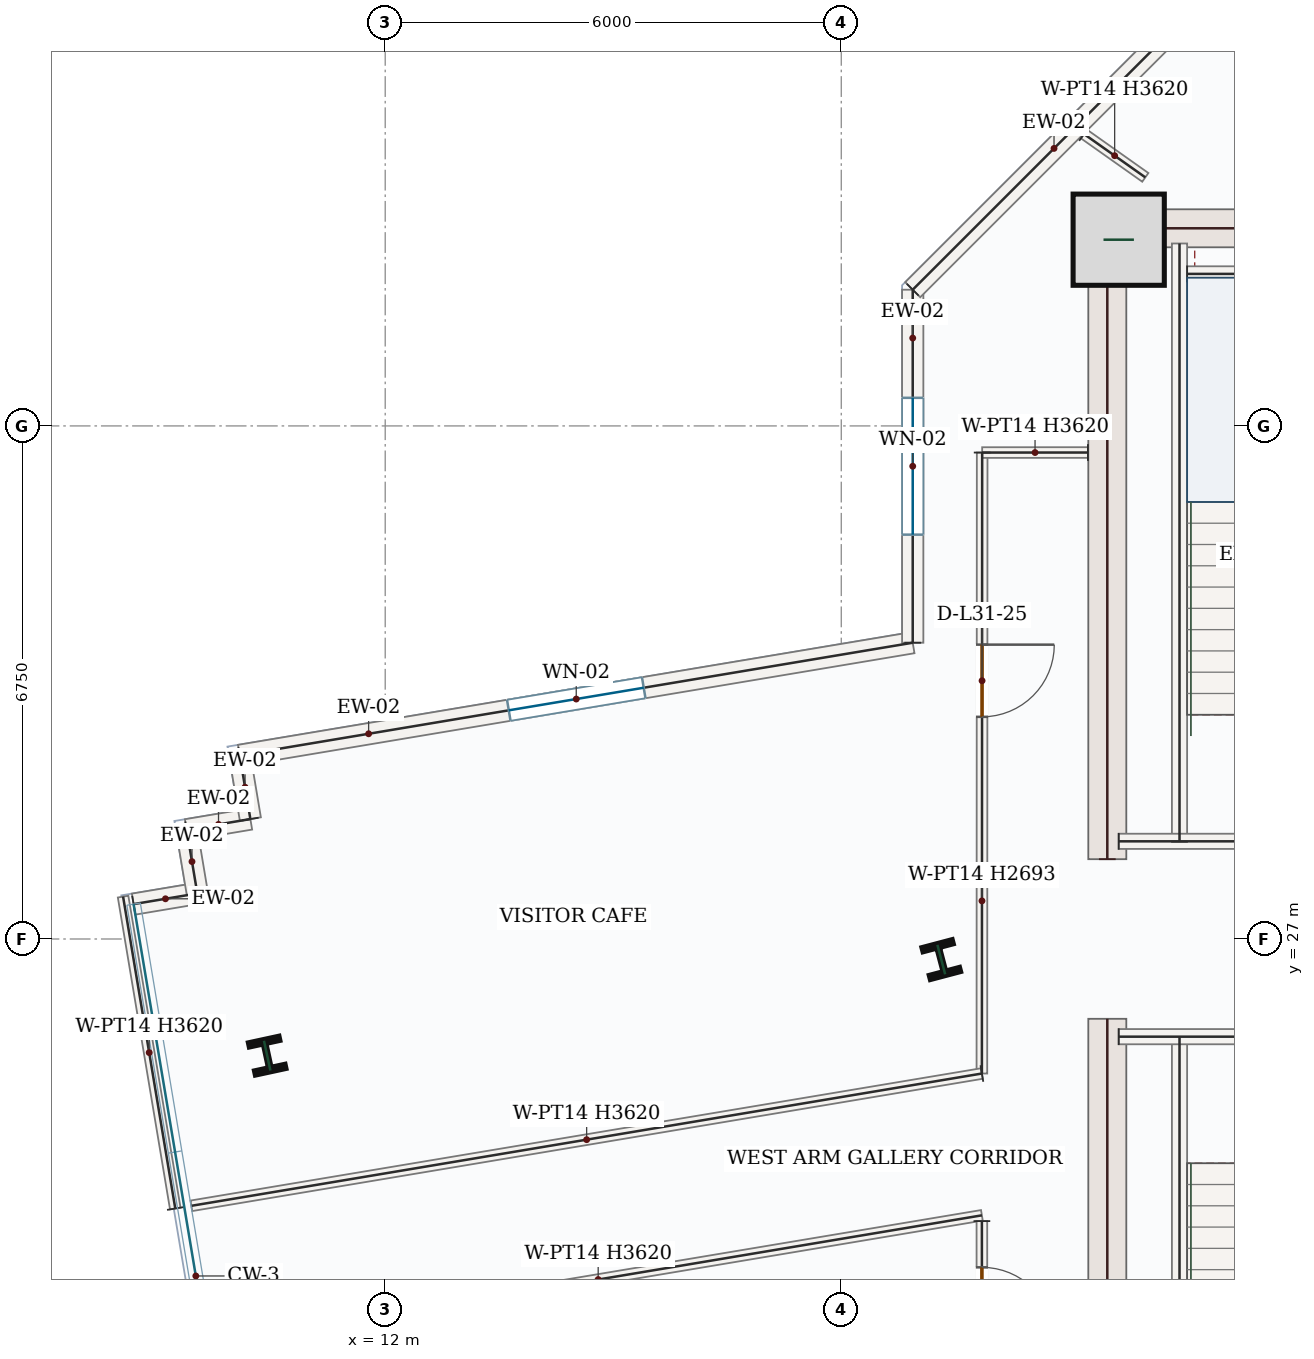
"""IFC4 building model, lengths in metres.
Left out: names, types, materials, properties, quantities, classifications, styles, units other than length and angle.
Written with IfcOpenShell. Run it as: python <this file> out.ifc"""

import sys

from ifc_helpers import new_model, si_unit, direction, frame, frame_2d, origin, origin_2d, place, context, subcontext, project, spatial, rectangle, i_section, extrude, source, transform, mapped, element, fill, save


model = new_model("IFC4")
c1 = context("Model", 3, precision=1e-05, world=origin(), true_north=direction((0.0, 1.0)))
c2 = subcontext(c1, "Body", "Model", "MODEL_VIEW")
j1 = project(units=[si_unit("LENGTHUNIT", "METRE"), si_unit("PLANEANGLEUNIT", "RADIAN")], contexts=[c1])
p1 = place(None, origin())
s1 = spatial("IfcSite", under=j1, at=p1, CompositionType="ELEMENT")
p2 = place(p1, origin())
s2 = spatial("IfcBuilding", under=s1, at=p2, CompositionType="ELEMENT")
p3 = place(p2, frame((0.0, 0.0, 139.5)))
s3 = spatial("IfcBuildingStorey", under=s2, at=p3, CompositionType="ELEMENT", Elevation=139.5)
m1 = source(origin(), c2, "Body", "SweptSolid", [
    extrude(rectangle(XDim=8.55, YDim=0.5, at=frame_2d((4.275, 0.0))), origin(), (0.0, 0.0, 1.0), 3.62),
])
for number, where, z_axis, x_axis in (
    (1, (21.5, 17.4, 0.0), (0.0, 0.0, 1.0), (0.0, 1.0, 0.0)),
    (2, (21.5, 28.05, 0.0), (0.0, 0.0, 1.0), (0.0, 1.0, 0.0)),
):
    element("IfcWall", number, at=place(p3, frame(where, z_axis=z_axis, x_axis=x_axis)), inside=s3, PredefinedType="SHEAR", context=c2, shape_type="MappedRepresentation", body=[
        mapped(m1, transform((0.0, 0.0, 0.0), x_axis=(1.0, 0.0, 0.0), y_axis=(0.0, 1.0, 0.0), z_axis=(0.0, 0.0, 1.0), scale=1.0)),
    ])
m2 = source(origin(), c2, "Body", "SweptSolid", [
    extrude(rectangle(XDim=7.0, YDim=0.5, at=frame_2d((3.5, 0.0))), origin(), (0.0, 0.0, 1.0), 3.62),
])
p4 = place(p3, frame((21.75, 36.35, 0.0), z_axis=(0.0, 0.0, 1.0), x_axis=(1.0, 0.0, 0.0)))
e3 = element("IfcWall", 3, at=p4, inside=s3, PredefinedType="SHEAR", context=c2, shape_type="MappedRepresentation", body=[
    mapped(m2, transform((0.0, 0.0, 0.0), x_axis=(1.0, 0.0, 0.0), y_axis=(0.0, 1.0, 0.0), z_axis=(0.0, 0.0, 1.0), scale=1.0)),
])
m3 = source(origin(), c2, "Body", "SweptSolid", [
    extrude(rectangle(XDim=1.2, YDim=1.2, at=origin_2d()), origin(), (0.0, 0.0, 1.0), 3.9),
])
p5 = place(p3, frame((21.65, 36.2, 0.0), z_axis=(0.0, 0.0, 1.0), x_axis=(1.0, 0.0, 0.0)))
e4 = element("IfcColumn", 4, at=p5, inside=s3, PredefinedType="COLUMN", context=c2, shape_type="MappedRepresentation", body=[
    mapped(m3, transform((0.0, 0.0, 0.0), x_axis=(1.0, 0.0, 0.0), y_axis=(0.0, 1.0, 0.0), z_axis=(0.0, 0.0, 1.0), scale=1.0)),
])
m4 = source(origin(), c2, "Body", "SweptSolid", [
    extrude(i_section(OverallWidth=0.412, OverallDepth=0.435, WebThickness=0.036, FlangeThickness=0.057, FilletRadius=0.018, at=origin_2d()), origin(), (0.0, 0.0, 1.0), 3.9),
])
for number, where, z_axis, x_axis in (
    (5, (19.316, 26.729, 0.0), (0.0, 0.0, 1.0), (0.967, 0.255, 0.0)),
    (6, (10.447, 25.465, 0.0), (0.0, 0.0, 1.0), (0.977, 0.211, 0.0)),
):
    element("IfcColumn", number, at=place(p3, frame(where, z_axis=z_axis, x_axis=x_axis)), inside=s3, PredefinedType="COLUMN", context=c2, shape_type="MappedRepresentation", body=[
        mapped(m4, transform((0.0, 0.0, 0.0), x_axis=(1.0, 0.0, 0.0), y_axis=(0.0, 1.0, 0.0), z_axis=(0.0, 0.0, 1.0), scale=1.0)),
    ])
m5 = source(origin(), c2, "Body", "SweptSolid", [
    extrude(rectangle(XDim=0.85, YDim=0.28, at=frame_2d((0.425, 0.0))), origin(), (0.0, 0.0, 1.0), 3.62),
])
for number, where, z_axis, x_axis in (
    (7, (8.69, 27.459, 0.0), (0.0, 0.0, 1.0), (0.986, 0.165, 0.0)),
    (8, (9.528, 27.599, 0.0), (0.0, 0.0, 1.0), (-0.165, 0.986, 0.0)),
    (9, (9.388, 28.438, 0.0), (0.0, 0.0, 1.0), (0.986, 0.165, 0.0)),
    (10, (10.226, 28.578, 0.0), (0.0, 0.0, 1.0), (-0.165, 0.986, 0.0)),
):
    element("IfcWall", number, at=place(p3, frame(where, z_axis=z_axis, x_axis=x_axis)), inside=s3, PredefinedType="SOLIDWALL", context=c2, shape_type="MappedRepresentation", body=[
        mapped(m5, transform((0.0, 0.0, 0.0), x_axis=(1.0, 0.0, 0.0), y_axis=(0.0, 1.0, 0.0), z_axis=(0.0, 0.0, 1.0), scale=1.0)),
    ])
p6 = place(p3, frame((10.086, 29.416, 0.0), z_axis=(0.0, 0.0, 1.0), x_axis=(0.98628492446, 0.165051651865, 0.0)))
e11 = element("IfcWall", 11, at=p6, inside=s3, PredefinedType="SOLIDWALL", context=c2, shape_type="SweptSolid", body=[
    extrude(rectangle(XDim=8.977, YDim=0.28, at=frame_2d((4.489, 0.0))), origin(), (0.0, 0.0, 1.0), 3.62),
])
p7 = place(p6, frame((3.589, 0.0, 0.85)))
e12 = element("IfcOpeningElement", 12, at=p7, cuts=e11, PredefinedType="OPENING", context=c2, shape_type="SweptSolid", body=[
    extrude(rectangle(XDim=1.8, YDim=1.75, at=frame_2d((0.9, 0.875))), frame((0.0, 0.15, 0.0), z_axis=(0.0, -1.0, 0.0), x_axis=(1.0, 0.0, 0.0)), (0.0, 0.0, 1.0), 0.3),
])
p8 = place(p3, frame((18.94, 30.898, 0.0), z_axis=(0.0, 0.0, 1.0), x_axis=(0.0, 1.0, 0.0)))
e13 = element("IfcWall", 13, at=p8, inside=s3, PredefinedType="SOLIDWALL", context=c2, shape_type="SweptSolid", body=[
    extrude(rectangle(XDim=4.644, YDim=0.28, at=frame_2d((2.322, 0.0))), origin(), (0.0, 0.0, 1.0), 3.62),
])
p9 = place(p8, frame((1.422, 0.0, 0.85)))
e14 = element("IfcOpeningElement", 14, at=p9, cuts=e13, PredefinedType="OPENING", context=c2, shape_type="SweptSolid", body=[
    extrude(rectangle(XDim=1.8, YDim=1.75, at=frame_2d((0.9, 0.875))), frame((0.0, 0.15, 0.0), z_axis=(0.0, -1.0, 0.0), x_axis=(1.0, 0.0, 0.0)), (0.0, 0.0, 1.0), 0.3),
])
m6 = source(origin(), c2, "Body", "SweptSolid", [
    extrude(rectangle(XDim=5.258, YDim=0.28, at=frame_2d((2.629, 0.0))), origin(), (0.0, 0.0, 1.0), 3.62),
])
p10 = place(p3, frame((18.94, 35.542, 0.0), z_axis=(0.0, 0.0, 1.0), x_axis=(0.707106781187, 0.707106781187, 0.0)))
e15 = element("IfcWall", 15, at=p10, inside=s3, PredefinedType="SOLIDWALL", context=c2, shape_type="MappedRepresentation", body=[
    mapped(m6, transform((0.0, 0.0, 0.0), x_axis=(1.0, 0.0, 0.0), y_axis=(0.0, 1.0, 0.0), z_axis=(0.0, 0.0, 1.0), scale=1.0)),
])
m7 = source(origin(), c2, "Body", "SweptSolid", [
    extrude(rectangle(XDim=7.87, YDim=0.2, at=frame_2d((3.935, 0.0))), origin(), (0.0, 0.0, 1.0), 3.62),
])
for number, where, z_axis, x_axis in (
    (16, (22.45, 17.85, 0.0), (0.0, 0.0, 1.0), (0.0, 1.0, 0.0)),
    (17, (22.45, 28.28, 0.0), (0.0, 0.0, 1.0), (0.0, 1.0, 0.0)),
):
    element("IfcWall", number, at=place(p3, frame(where, z_axis=z_axis, x_axis=x_axis)), inside=s3, PredefinedType="SOLIDWALL", context=c2, shape_type="MappedRepresentation", body=[
        mapped(m7, transform((0.0, 0.0, 0.0), x_axis=(1.0, 0.0, 0.0), y_axis=(0.0, 1.0, 0.0), z_axis=(0.0, 0.0, 1.0), scale=1.0)),
    ])
m8 = source(origin(), c2, "Body", "SweptSolid", [
    extrude(rectangle(XDim=4.25, YDim=0.2, at=frame_2d((2.125, 0.0))), origin(), (0.0, 0.0, 1.0), 3.62),
])
for number, where, z_axis, x_axis in (
    (18, (21.65, 25.715, 0.0), (0.0, 0.0, 1.0), (1.0, 0.0, 0.0)),
    (19, (21.65, 28.285, 0.0), (0.0, 0.0, 1.0), (1.0, 0.0, 0.0)),
):
    element("IfcWall", number, at=place(p3, frame(where, z_axis=z_axis, x_axis=x_axis)), inside=s3, PredefinedType="SOLIDWALL", context=c2, shape_type="MappedRepresentation", body=[
        mapped(m8, transform((0.0, 0.0, 0.0), x_axis=(1.0, 0.0, 0.0), y_axis=(0.0, 1.0, 0.0), z_axis=(0.0, 0.0, 1.0), scale=1.0)),
    ])
m9 = source(origin(), c2, "Body", "SweptSolid", [
    extrude(rectangle(XDim=3.25, YDim=0.2, at=frame_2d((1.625, 0.0))), origin(), (0.0, 0.0, 1.0), 3.62),
])
p11 = place(p3, frame((22.55, 35.75, 0.0), z_axis=(0.0, 0.0, 1.0), x_axis=(1.0, 0.0, 0.0)))
e20 = element("IfcWall", 20, at=p11, inside=s3, PredefinedType="SOLIDWALL", context=c2, shape_type="MappedRepresentation", body=[
    mapped(m9, transform((0.0, 0.0, 0.0), x_axis=(1.0, 0.0, 0.0), y_axis=(0.0, 1.0, 0.0), z_axis=(0.0, 0.0, 1.0), scale=1.0)),
])
p12 = place(p3, frame((19.854, 33.399, 0.0), z_axis=(0.0, 0.0, 1.0), x_axis=(-0.000448283031, -0.999999899521, 0.0)))
e21 = element("IfcWall", 21, at=p12, inside=s3, PredefinedType="PARTITIONING", context=c2, shape_type="SweptSolid", body=[
    extrude(rectangle(XDim=8.169, YDim=0.14, at=frame_2d((4.084, 0.0))), origin(), (0.0, 0.0, 1.0), 2.693),
])
p13 = place(p12, frame((2.527, 0.0, 0.0)))
e22 = element("IfcOpeningElement", 22, at=p13, cuts=e21, PredefinedType="OPENING", context=c2, shape_type="SweptSolid", body=[
    extrude(rectangle(XDim=0.95, YDim=2.15, at=frame_2d((0.475, 1.075))), frame((0.0, 0.08, 0.0), z_axis=(0.0, -1.0, 0.0), x_axis=(1.0, 0.0, 0.0)), (0.0, 0.0, 1.0), 0.16),
])
m10 = source(origin(), c2, "Body", "SweptSolid", [
    extrude(rectangle(XDim=10.544, YDim=0.14, at=frame_2d((5.272, 0.0))), origin(), (0.0, 0.0, 1.0), 3.62),
])
p14 = place(p3, frame((19.85, 25.23, 0.0), z_axis=(0.0, 0.0, 1.0), x_axis=(-0.986287336963, -0.165037235031, 0.0)))
e23 = element("IfcWall", 23, at=p14, inside=s3, PredefinedType="PARTITIONING", context=c2, shape_type="MappedRepresentation", body=[
    mapped(m10, transform((0.0, 0.0, 0.0), x_axis=(1.0, 0.0, 0.0), y_axis=(0.0, 1.0, 0.0), z_axis=(0.0, 0.0, 1.0), scale=1.0)),
])
m11 = source(origin(), c2, "Body", "SweptSolid", [
    extrude(rectangle(XDim=4.16, YDim=0.14, at=frame_2d((2.08, 0.0))), origin(), (0.0, 0.0, 1.0), 3.62),
])
p15 = place(p3, frame((9.238, 23.454, 0.0), z_axis=(0.0, 0.0, 1.0), x_axis=(-0.165027060507, 0.98628903943, 0.0)))
e24 = element("IfcWall", 24, at=p15, inside=s3, PredefinedType="PARTITIONING", context=c2, shape_type="MappedRepresentation", body=[
    mapped(m11, transform((0.0, 0.0, 0.0), x_axis=(1.0, 0.0, 0.0), y_axis=(0.0, 1.0, 0.0), z_axis=(0.0, 0.0, 1.0), scale=1.0)),
])
m12 = source(origin(), c2, "Body", "SweptSolid", [
    extrude(rectangle(XDim=0.988, YDim=0.14, at=frame_2d((0.494, 0.0))), origin(), (0.0, 0.0, 1.0), 3.62),
])
p16 = place(p3, frame((21.193, 37.59, 0.0), z_axis=(0.0, 0.0, 1.0), x_axis=(0.81652929337, -0.577304004029, 0.0)))
e25 = element("IfcWall", 25, at=p16, inside=s3, PredefinedType="PARTITIONING", context=c2, shape_type="MappedRepresentation", body=[
    mapped(m12, transform((0.0, 0.0, 0.0), x_axis=(1.0, 0.0, 0.0), y_axis=(0.0, 1.0, 0.0), z_axis=(0.0, 0.0, 1.0), scale=1.0)),
])
m13 = source(origin(), c2, "Body", "SweptSolid", [
    extrude(rectangle(XDim=1.391, YDim=0.14, at=frame_2d((0.696, 0.0))), origin(), (0.0, 0.0, 1.0), 3.62),
])
p17 = place(p3, frame((21.245, 33.4, 0.0), z_axis=(0.0, 0.0, 1.0), x_axis=(-0.999999938421, -0.00035093874, 0.0)))
e26 = element("IfcWall", 26, at=p17, inside=s3, PredefinedType="PARTITIONING", context=c2, shape_type="MappedRepresentation", body=[
    mapped(m13, transform((0.0, 0.0, 0.0), x_axis=(1.0, 0.0, 0.0), y_axis=(0.0, 1.0, 0.0), z_axis=(0.0, 0.0, 1.0), scale=1.0)),
])
m14 = source(origin(), c2, "Body", "SweptSolid", [
    extrude(rectangle(XDim=10.237, YDim=0.14, at=frame_2d((5.118, 0.0))), origin(), (0.0, 0.0, 1.0), 3.62),
])
p18 = place(p3, frame((9.754, 21.675, 0.0), z_axis=(0.0, 0.0, 1.0), x_axis=(0.986290594835, 0.165017764319, 0.0)))
e27 = element("IfcWall", 27, at=p18, inside=s3, PredefinedType="PARTITIONING", context=c2, shape_type="MappedRepresentation", body=[
    mapped(m14, transform((0.0, 0.0, 0.0), x_axis=(1.0, 0.0, 0.0), y_axis=(0.0, 1.0, 0.0), z_axis=(0.0, 0.0, 1.0), scale=1.0)),
])
p19 = place(p3, frame((19.85, 23.289, 0.0), z_axis=(0.0, 0.0, 1.0), x_axis=(0.000363372069, -0.99999993398, 0.0)))
e28 = element("IfcWall", 28, at=p19, inside=s3, PredefinedType="PARTITIONING", context=c2, shape_type="SweptSolid", body=[
    extrude(rectangle(XDim=2.688, YDim=0.14, at=frame_2d((1.344, 0.0))), origin(), (0.0, 0.0, 1.0), 3.079),
])
p20 = place(p19, frame((0.608, 0.0, 0.0)))
e29 = element("IfcOpeningElement", 29, at=p20, cuts=e28, PredefinedType="OPENING", context=c2, shape_type="SweptSolid", body=[
    extrude(rectangle(XDim=0.95, YDim=2.15, at=frame_2d((0.475, 1.075))), frame((0.0, 0.08, 0.0), z_axis=(0.0, -1.0, 0.0), x_axis=(1.0, 0.0, 0.0)), (0.0, 0.0, 1.0), 0.16),
])
m15 = source(origin(), c2, "Body", "SweptSolid", [
    extrude(rectangle(XDim=1.8, YDim=1.75, at=frame_2d((0.9, 0.875))), frame((0.0, 0.03, 0.0), z_axis=(0.0, -1.0, 0.0), x_axis=(1.0, 0.0, 0.0)), (0.0, 0.0, 1.0), 0.06),
])
p21 = place(p7, origin())
e30 = element("IfcWindow", 30, at=p21, inside=s3, PartitioningType="DOUBLE_PANEL_VERTICAL", PredefinedType="WINDOW", context=c2, shape_type="MappedRepresentation", body=[
    mapped(m15, transform((0.0, 0.0, 0.0), x_axis=(1.0, 0.0, 0.0), y_axis=(0.0, 1.0, 0.0), z_axis=(0.0, 0.0, 1.0), scale=1.0)),
])
fill(e12, e30)
p22 = place(p9, origin())
e31 = element("IfcWindow", 31, at=p22, inside=s3, PartitioningType="DOUBLE_PANEL_VERTICAL", PredefinedType="WINDOW", context=c2, shape_type="MappedRepresentation", body=[
    mapped(m15, transform((0.0, 0.0, 0.0), x_axis=(1.0, 0.0, 0.0), y_axis=(0.0, 1.0, 0.0), z_axis=(0.0, 0.0, 1.0), scale=1.0)),
])
fill(e14, e31)
m16 = source(origin(), c2, "Body", "SweptSolid", [
    extrude(rectangle(XDim=0.95, YDim=2.15, at=frame_2d((0.475, 1.075))), frame((0.0, 0.025, 0.0), z_axis=(0.0, -1.0, 0.0), x_axis=(1.0, 0.0, 0.0)), (0.0, 0.0, 1.0), 0.05),
])
p23 = place(p13, origin())
e32 = element("IfcDoor", 32, at=p23, inside=s3, OperationType="SINGLE_SWING_LEFT", PredefinedType="DOOR", context=c2, shape_type="MappedRepresentation", body=[
    mapped(m16, transform((0.0, 0.0, 0.0), x_axis=(1.0, 0.0, 0.0), y_axis=(0.0, 1.0, 0.0), z_axis=(0.0, 0.0, 1.0), scale=1.0)),
])
fill(e22, e32)
p24 = place(p20, origin())
e33 = element("IfcDoor", 33, at=p24, inside=s3, OperationType="SINGLE_SWING_RIGHT", PredefinedType="DOOR", context=c2, shape_type="MappedRepresentation", body=[
    mapped(m16, transform((0.0, 0.0, 0.0), x_axis=(1.0, 0.0, 0.0), y_axis=(0.0, 1.0, 0.0), z_axis=(0.0, 0.0, 1.0), scale=1.0)),
])
fill(e29, e33)
save(model, sys.argv[1])
